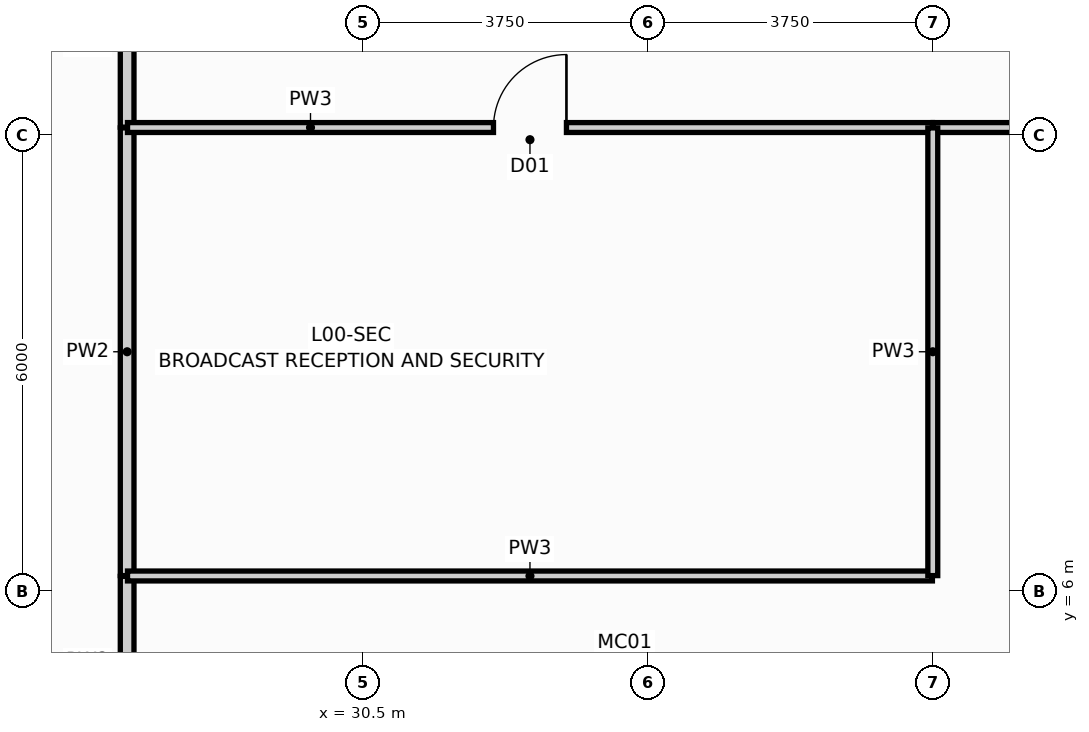
"""IFC4 building model, lengths in metres.
Left out: names, types, materials, properties, quantities, classifications, styles, units other than length and angle.
Written with IfcOpenShell. Run it as: python <this file> out.ifc"""

import sys

from ifc_helpers import new_model, si_unit, direction, frame, frame_2d, origin, place, context, subcontext, project, spatial, rectangle, extrude, element, fill, save


model = new_model("IFC4")
c1 = context("Model", 3, precision=1e-05, world=origin(), true_north=direction((0.0, 1.0)))
c2 = subcontext(c1, "Body", "Model", "MODEL_VIEW")
j1 = project(units=[si_unit("LENGTHUNIT", "METRE"), si_unit("PLANEANGLEUNIT", "RADIAN")], contexts=[c1])
p1 = place(None, origin())
s1 = spatial("IfcSite", under=j1, at=p1, CompositionType="ELEMENT")
p2 = place(p1, origin())
s2 = spatial("IfcBuilding", under=s1, at=p2, CompositionType="ELEMENT")
p3 = place(p2, origin())
s3 = spatial("IfcBuildingStorey", under=s2, at=p3, CompositionType="ELEMENT", Elevation=0.0)
p4 = place(p3, frame((27.4, 6.205, 0.0), z_axis=(0.0, 0.0, 1.0), x_axis=(0.0, 1.0, 0.0)))
e1 = element("IfcWall", 1, at=p4, inside=s3, PredefinedType="PARTITIONING", context=c2, shape_type="SweptSolid", body=[
    extrude(rectangle(XDim=5.89, YDim=0.18, at=frame_2d((2.945, 0.0))), origin(), (0.0, 0.0, 1.0), 5.08),
])
p5 = place(p3, frame((27.4, 3.98, 0.0), z_axis=(0.0, 0.0, 1.0), x_axis=(0.0, 1.0, 0.0)))
e2 = element("IfcWall", 2, at=p5, inside=s3, PredefinedType="PARTITIONING", context=c2, shape_type="SweptSolid", body=[
    extrude(rectangle(XDim=2.215, YDim=0.18, at=frame_2d((1.107, 0.0))), origin(), (0.0, 0.0, 1.0), 5.08),
])
p6 = place(p3, frame((27.4, 12.105, 0.0), z_axis=(0.0, 0.0, 1.0), x_axis=(0.0, 1.0, 0.0)))
e3 = element("IfcWall", 3, at=p6, inside=s3, PredefinedType="PARTITIONING", context=c2, shape_type="SweptSolid", body=[
    extrude(rectangle(XDim=2.19, YDim=0.18, at=frame_2d((1.095, 0.0))), origin(), (0.0, 0.0, 1.0), 5.08),
])
p7 = place(p3, frame((38.005, 12.1, 0.0), z_axis=(0.0, 0.0, 1.0), x_axis=(1.0, 0.0, 0.0)))
e4 = element("IfcWall", 4, at=p7, inside=s3, PredefinedType="PARTITIONING", context=c2, shape_type="SweptSolid", body=[
    extrude(rectangle(XDim=10.59, YDim=0.13, at=frame_2d((5.295, 0.0))), origin(), (0.0, 0.0, 1.0), 5.08),
])
p8 = place(p3, frame((27.405, 12.1, 0.0), z_axis=(0.0, 0.0, 1.0), x_axis=(1.0, 0.0, 0.0)))
e5 = element("IfcWall", 5, at=p8, inside=s3, PredefinedType="PARTITIONING", context=c2, shape_type="SweptSolid", body=[
    extrude(rectangle(XDim=10.59, YDim=0.13, at=frame_2d((5.295, 0.0))), origin(), (0.0, 0.0, 1.0), 5.08),
])
p9 = place(p8, frame((4.815, 0.0, 0.0)))
e6 = element("IfcOpeningElement", 6, at=p9, cuts=e5, PredefinedType="OPENING", context=c2, shape_type="SweptSolid", body=[
    extrude(rectangle(XDim=0.96, YDim=2.15, at=frame_2d((0.48, 1.075))), frame((0.0, 0.077, 0.0), z_axis=(0.0, -1.0, 0.0), x_axis=(1.0, 0.0, 0.0)), (0.0, 0.0, 1.0), 0.154),
])
p10 = place(p3, frame((27.405, 6.2, 0.0), z_axis=(0.0, 0.0, 1.0), x_axis=(1.0, 0.0, 0.0)))
e7 = element("IfcWall", 7, at=p10, inside=s3, PredefinedType="PARTITIONING", context=c2, shape_type="SweptSolid", body=[
    extrude(rectangle(XDim=10.59, YDim=0.13, at=frame_2d((5.295, 0.0))), origin(), (0.0, 0.0, 1.0), 5.08),
])
p11 = place(p3, frame((38.0, 6.205, 0.0), z_axis=(0.0, 0.0, 1.0), x_axis=(0.0, 1.0, 0.0)))
e8 = element("IfcWall", 8, at=p11, inside=s3, PredefinedType="PARTITIONING", context=c2, shape_type="SweptSolid", body=[
    extrude(rectangle(XDim=5.89, YDim=0.13, at=frame_2d((2.945, 0.0))), origin(), (0.0, 0.0, 1.0), 5.08),
])
p12 = place(p9, origin())
e9 = element("IfcDoor", 9, at=p12, inside=s3, OperationType="SINGLE_SWING_RIGHT", PredefinedType="DOOR", context=c2, shape_type="SweptSolid", body=[
    extrude(rectangle(XDim=0.96, YDim=2.15, at=frame_2d((0.48, 1.075))), frame((0.0, 0.025, 0.0), z_axis=(0.0, -1.0, 0.0), x_axis=(1.0, 0.0, 0.0)), (0.0, 0.0, 1.0), 0.05),
])
fill(e6, e9)
save(model, sys.argv[1])
